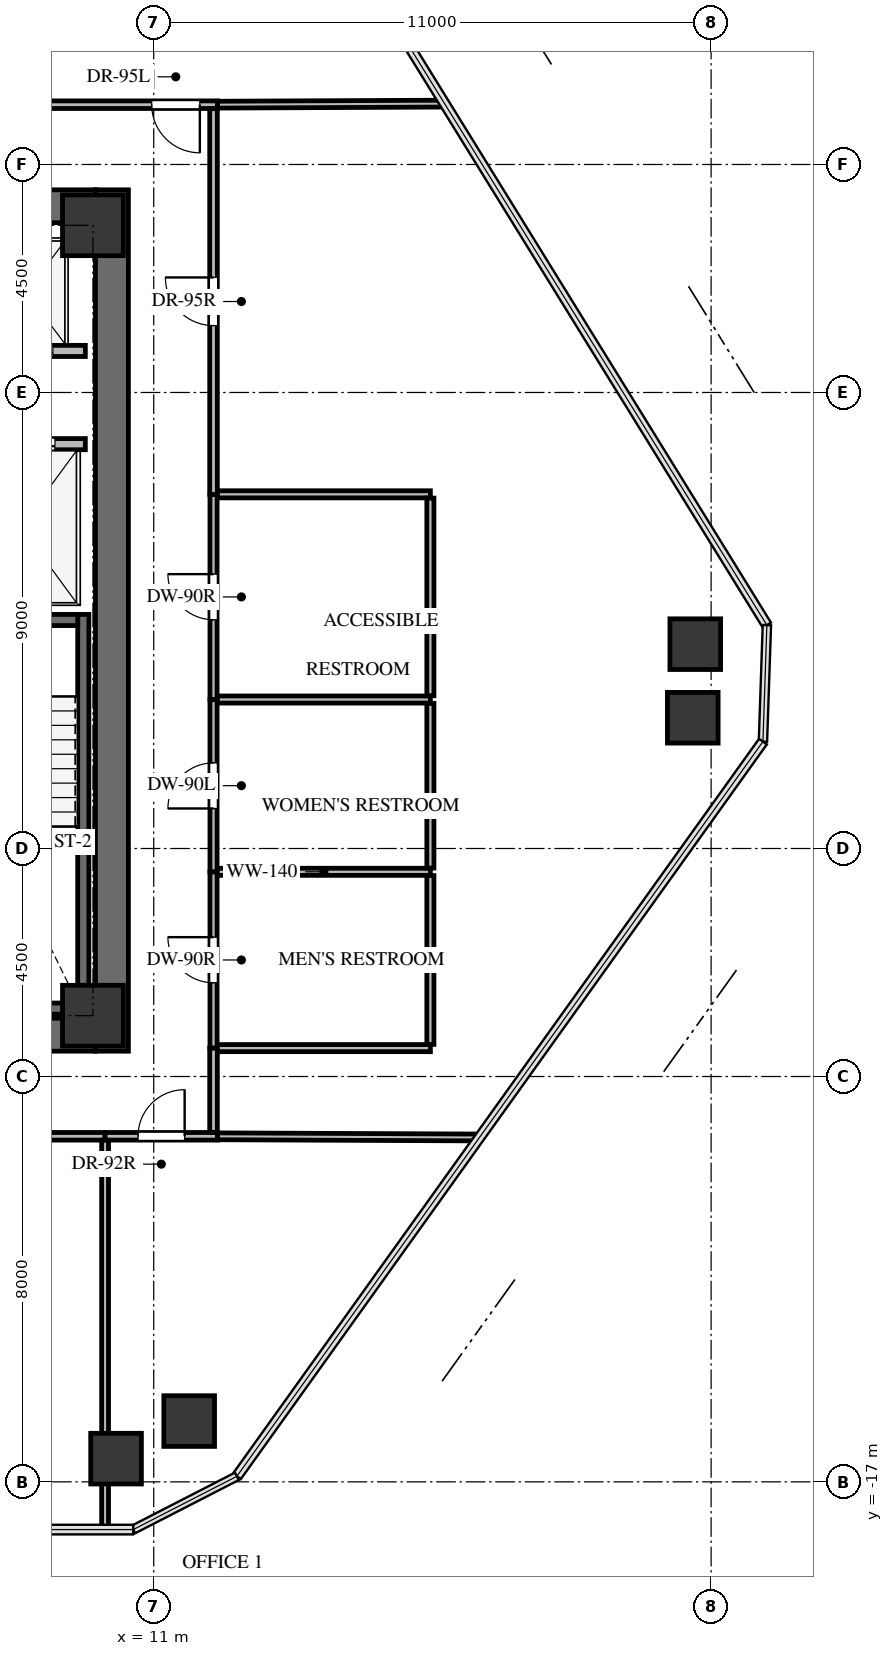
"""IFC4 building model, lengths in metres.
Left out: names, types, materials, properties, quantities, classifications, styles, units other than length and angle.
Written with IfcOpenShell. Run it as: python <this file> out.ifc"""

import sys

from ifc_helpers import new_model, si_unit, direction, frame, frame_2d, origin, origin_2d, place, context, subcontext, project, spatial, rectangle, extrude, source, transform, mapped, element, fill, save


model = new_model("IFC4")
c1 = context("Model", 3, precision=1e-05, world=origin(), true_north=direction((0.0, 1.0)))
c2 = subcontext(c1, "Body", "Model", "MODEL_VIEW")
j1 = project(units=[si_unit("LENGTHUNIT", "METRE"), si_unit("PLANEANGLEUNIT", "RADIAN")], contexts=[c1])
p1 = place(None, origin())
s1 = spatial("IfcSite", under=j1, at=p1, CompositionType="ELEMENT")
p2 = place(p1, origin())
s2 = spatial("IfcBuilding", under=s1, at=p2, CompositionType="ELEMENT")
p3 = place(p2, frame((0.0, 0.0, 180.4)))
s3 = spatial("IfcBuildingStorey", under=s2, at=p3, CompositionType="ELEMENT", Elevation=180.4)
p4 = place(p3, frame((10.175, -8.5, 0.0), z_axis=(0.0, 0.0, 1.0), x_axis=(0.0, 1.0, 0.0)))
e1 = element("IfcWall", 1, at=p4, inside=s3, PredefinedType="SHEAR", context=c2, shape_type="SweptSolid", body=[
    extrude(rectangle(XDim=17.0, YDim=0.65, at=frame_2d((8.5, 0.0))), origin(), (0.0, 0.0, 1.0), 3.3),
])
p5 = place(p3, frame((2.1, -8.175, 0.0), z_axis=(0.0, 0.0, 1.0), x_axis=(1.0, 0.0, 0.0)))
e2 = element("IfcWall", 2, at=p5, inside=s3, PredefinedType="SHEAR", context=c2, shape_type="SweptSolid", body=[
    extrude(rectangle(XDim=7.75, YDim=0.65, at=frame_2d((3.875, 0.0))), origin(), (0.0, 0.0, 1.0), 3.3),
])
p6 = place(p3, frame((-9.85, 8.175, 0.0), z_axis=(0.0, 0.0, 1.0), x_axis=(1.0, 0.0, 0.0)))
e3 = element("IfcWall", 3, at=p6, inside=s3, PredefinedType="SHEAR", context=c2, shape_type="SweptSolid", body=[
    extrude(rectangle(XDim=19.7, YDim=0.65, at=frame_2d((9.85, 0.0))), origin(), (0.0, 0.0, 1.0), 3.3),
])
p7 = place(p3, frame((9.61, -7.77, -0.24), z_axis=(0.0, 0.0, 1.0), x_axis=(0.0, 1.0, 0.0)))
e4 = element("IfcWall", 4, at=p7, inside=s3, PredefinedType="SHEAR", context=c2, shape_type="SweptSolid", body=[
    extrude(rectangle(XDim=7.89, YDim=0.22, at=frame_2d((3.945, 0.0))), origin(), (0.0, 0.0, 1.0), 3.3),
])
for number, where, z_axis, x_axis in (
    (5, (6.54, -7.66, -0.24), (0.0, 0.0, 1.0), (1.0, 0.0, 0.0)),
    (6, (9.5, 0.01, -0.24), (0.0, 0.0, 1.0), (-1.0, 0.0, 0.0)),
):
    element("IfcWall", number, at=place(p3, frame(where, z_axis=z_axis, x_axis=x_axis)), inside=s3, PredefinedType="SHEAR", context=c2, shape_type="SweptSolid", body=[
        extrude(rectangle(XDim=2.96, YDim=0.22, at=frame_2d((1.48, 0.0))), origin(), (0.0, 0.0, 1.0), 3.3),
    ])
m1 = source(origin(), c2, "Body", "SweptSolid", [
    extrude(rectangle(XDim=1.2, YDim=1.2, at=origin_2d()), origin(), (0.0, 0.0, 1.0), 3.3),
])
for number, where, z_axis, x_axis in (
    (7, (9.8, -7.8, -0.24), (0.0, 0.0, 1.0), (1.0, 0.0, 0.0)),
    (8, (9.8, 7.8, -0.24), (0.0, 0.0, 1.0), (1.0, 0.0, 0.0)),
):
    element("IfcColumn", number, at=place(p3, frame(where, z_axis=z_axis, x_axis=x_axis)), inside=s3, PredefinedType="COLUMN", context=c2, shape_type="MappedRepresentation", body=[
        mapped(m1, transform((0.0, 0.0, 0.0), x_axis=(1.0, 0.0, 0.0), y_axis=(0.0, 1.0, 0.0), z_axis=(0.0, 0.0, 1.0), scale=1.0)),
    ])
m2 = source(origin(), c2, "Body", "SweptSolid", [
    extrude(rectangle(XDim=1.0, YDim=1.0, at=origin_2d()), origin(), (0.0, 0.0, 1.0), 3.3),
])
for number, where, z_axis, x_axis in (
    (9, (21.687, -0.467, -0.24), (0.0, 0.0, 1.0), (1.0, 0.0, 0.0)),
    (10, (21.638, -1.92, -0.24), (0.0, 0.0, 1.0), (1.0, 0.0, 0.0)),
    (11, (11.7, -15.8, -0.24), (0.0, 0.0, 1.0), (1.0, 0.0, 0.0)),
    (12, (10.257, -16.542, -0.24), (0.0, 0.0, 1.0), (1.0, 0.0, 0.0)),
):
    element("IfcColumn", number, at=place(p3, frame(where, z_axis=z_axis, x_axis=x_axis)), inside=s3, PredefinedType="COLUMN", context=c2, shape_type="MappedRepresentation", body=[
        mapped(m2, transform((0.0, 0.0, 0.0), x_axis=(1.0, 0.0, 0.0), y_axis=(0.0, 1.0, 0.0), z_axis=(0.0, 0.0, 1.0), scale=1.0)),
    ])
p8 = place(p3, frame((4.6, 3.48, 0.0), z_axis=(0.0, 0.0, 1.0), x_axis=(1.0, 0.0, 0.0)))
e13 = element("IfcWall", 13, at=p8, inside=s3, PredefinedType="SOLIDWALL", context=c2, shape_type="SweptSolid", body=[
    extrude(rectangle(XDim=5.05, YDim=0.22, at=frame_2d((2.525, 0.0))), origin(), (0.0, 0.0, 1.0), 3.045),
])
p9 = place(p8, frame((0.55, 0.0, 0.0)))
e14 = element("IfcOpeningElement", 14, at=p9, cuts=e13, PredefinedType="OPENING", context=c2, shape_type="SweptSolid", body=[
    extrude(rectangle(XDim=1.4, YDim=2.15, at=frame_2d((0.7, 1.075))), frame((0.0, 0.12, 0.0), z_axis=(0.0, -1.0, 0.0), x_axis=(1.0, 0.0, 0.0)), (0.0, 0.0, 1.0), 0.24),
])
p10 = place(p8, frame((3.05, 0.0, 0.0)))
e15 = element("IfcOpeningElement", 15, at=p10, cuts=e13, PredefinedType="OPENING", context=c2, shape_type="SweptSolid", body=[
    extrude(rectangle(XDim=1.4, YDim=2.15, at=frame_2d((0.7, 1.075))), frame((0.0, 0.12, 0.0), z_axis=(0.0, -1.0, 0.0), x_axis=(1.0, 0.0, 0.0)), (0.0, 0.0, 1.0), 0.24),
])
p11 = place(p3, frame((2.325, 5.32, 0.0), z_axis=(0.0, 0.0, 1.0), x_axis=(1.0, 0.0, 0.0)))
e16 = element("IfcWall", 16, at=p11, inside=s3, PredefinedType="SOLIDWALL", context=c2, shape_type="SweptSolid", body=[
    extrude(rectangle(XDim=7.325, YDim=0.22, at=frame_2d((3.663, 0.0))), origin(), (0.0, 0.0, 1.0), 3.045),
])
p12 = place(p11, frame((0.275, 0.0, 0.0)))
e17 = element("IfcOpeningElement", 17, at=p12, cuts=e16, PredefinedType="OPENING", context=c2, shape_type="SweptSolid", body=[
    extrude(rectangle(XDim=1.1, YDim=2.15, at=frame_2d((0.55, 1.075))), frame((0.0, 0.12, 0.0), z_axis=(0.0, -1.0, 0.0), x_axis=(1.0, 0.0, 0.0)), (0.0, 0.0, 1.0), 0.24),
])
p13 = place(p11, frame((2.045, 0.0, 0.0)))
e18 = element("IfcOpeningElement", 18, at=p13, cuts=e16, PredefinedType="OPENING", context=c2, shape_type="SweptSolid", body=[
    extrude(rectangle(XDim=1.1, YDim=2.15, at=frame_2d((0.55, 1.075))), frame((0.0, 0.12, 0.0), z_axis=(0.0, -1.0, 0.0), x_axis=(1.0, 0.0, 0.0)), (0.0, 0.0, 1.0), 0.24),
])
p14 = place(p11, frame((3.815, 0.0, 0.0)))
e19 = element("IfcOpeningElement", 19, at=p14, cuts=e16, PredefinedType="OPENING", context=c2, shape_type="SweptSolid", body=[
    extrude(rectangle(XDim=1.1, YDim=2.15, at=frame_2d((0.55, 1.075))), frame((0.0, 0.12, 0.0), z_axis=(0.0, -1.0, 0.0), x_axis=(1.0, 0.0, 0.0)), (0.0, 0.0, 1.0), 0.24),
])
p15 = place(p11, frame((5.585, 0.0, 0.0)))
e20 = element("IfcOpeningElement", 20, at=p15, cuts=e16, PredefinedType="OPENING", context=c2, shape_type="SweptSolid", body=[
    extrude(rectangle(XDim=1.1, YDim=2.15, at=frame_2d((0.55, 1.075))), frame((0.0, 0.12, 0.0), z_axis=(0.0, -1.0, 0.0), x_axis=(1.0, 0.0, 0.0)), (0.0, 0.0, 1.0), 0.24),
])
p16 = place(p3, frame((12.18, -8.44, 0.0), z_axis=(0.0, 0.0, 1.0), x_axis=(0.0, 1.0, 0.0)))
e21 = element("IfcWall", 21, at=p16, inside=s3, PredefinedType="PARTITIONING", context=c2, shape_type="SweptSolid", body=[
    extrude(rectangle(XDim=3.48, YDim=0.14, at=frame_2d((1.74, 0.0))), origin(), (0.0, 0.0, 1.0), 3.045),
])
p17 = place(p16, frame((1.29, 0.0, 0.0)))
e22 = element("IfcOpeningElement", 22, at=p17, cuts=e21, PredefinedType="OPENING", context=c2, shape_type="SweptSolid", body=[
    extrude(rectangle(XDim=0.9, YDim=2.05, at=frame_2d((0.45, 1.025))), frame((0.0, 0.08, 0.0), z_axis=(0.0, -1.0, 0.0), x_axis=(1.0, 0.0, 0.0)), (0.0, 0.0, 1.0), 0.16),
])
p18 = place(p3, frame((12.18, -4.96, 0.0), z_axis=(0.0, 0.0, 1.0), x_axis=(0.0, 1.0, 0.0)))
e23 = element("IfcWall", 23, at=p18, inside=s3, PredefinedType="PARTITIONING", context=c2, shape_type="SweptSolid", body=[
    extrude(rectangle(XDim=3.4, YDim=0.14, at=frame_2d((1.7, 0.0))), origin(), (0.0, 0.0, 1.0), 3.045),
])
p19 = place(p18, frame((1.25, 0.0, 0.0)))
e24 = element("IfcOpeningElement", 24, at=p19, cuts=e23, PredefinedType="OPENING", context=c2, shape_type="SweptSolid", body=[
    extrude(rectangle(XDim=0.9, YDim=2.05, at=frame_2d((0.45, 1.025))), frame((0.0, 0.08, 0.0), z_axis=(0.0, -1.0, 0.0), x_axis=(1.0, 0.0, 0.0)), (0.0, 0.0, 1.0), 0.16),
])
p20 = place(p3, frame((12.18, -1.56, 0.0), z_axis=(0.0, 0.0, 1.0), x_axis=(0.0, 1.0, 0.0)))
e25 = element("IfcWall", 25, at=p20, inside=s3, PredefinedType="PARTITIONING", context=c2, shape_type="SweptSolid", body=[
    extrude(rectangle(XDim=4.05, YDim=0.14, at=frame_2d((2.025, 0.0))), origin(), (0.0, 0.0, 1.0), 2.242),
])
p21 = place(p20, frame((1.575, 0.0, 0.0)))
e26 = element("IfcOpeningElement", 26, at=p21, cuts=e25, PredefinedType="OPENING", context=c2, shape_type="SweptSolid", body=[
    extrude(rectangle(XDim=0.9, YDim=2.05, at=frame_2d((0.45, 1.025))), frame((0.0, 0.08, 0.0), z_axis=(0.0, -1.0, 0.0), x_axis=(1.0, 0.0, 0.0)), (0.0, 0.0, 1.0), 0.16),
])
p22 = place(p3, frame((12.26, 10.18, 0.0), z_axis=(0.0, 0.0, 1.0), x_axis=(-1.0, 0.0, 0.0)))
e27 = element("IfcWall", 27, at=p22, inside=s3, PredefinedType="PARTITIONING", context=c2, shape_type="SweptSolid", body=[
    extrude(rectangle(XDim=3.72, YDim=0.15, at=frame_2d((1.86, 0.0))), origin(), (0.0, 0.0, 1.0), 2.242),
])
p23 = place(p22, frame((0.35, 0.0, 0.0)))
e28 = element("IfcOpeningElement", 28, at=p23, cuts=e27, PredefinedType="OPENING", context=c2, shape_type="SweptSolid", body=[
    extrude(rectangle(XDim=0.95, YDim=2.1, at=frame_2d((0.475, 1.05))), frame((0.0, 0.085, 0.0), z_axis=(0.0, -1.0, 0.0), x_axis=(1.0, 0.0, 0.0)), (0.0, 0.0, 1.0), 0.17),
])
p24 = place(p3, frame((4.54, -10.18, 0.0), z_axis=(0.0, 0.0, 1.0), x_axis=(1.0, 0.0, 0.0)))
e29 = element("IfcWall", 29, at=p24, inside=s3, PredefinedType="PARTITIONING", context=c2, shape_type="SweptSolid", body=[
    extrude(rectangle(XDim=5.5, YDim=0.15, at=frame_2d((2.75, 0.0))), origin(), (0.0, 0.0, 1.0), 2.242),
])
p25 = place(p24, frame((2.3, 0.0, 0.0)))
e30 = element("IfcOpeningElement", 30, at=p25, cuts=e29, PredefinedType="OPENING", context=c2, shape_type="SweptSolid", body=[
    extrude(rectangle(XDim=0.9, YDim=2.05, at=frame_2d((0.45, 1.025))), frame((0.0, 0.085, 0.0), z_axis=(0.0, -1.0, 0.0), x_axis=(1.0, 0.0, 0.0)), (0.0, 0.0, 1.0), 0.17),
])
p26 = place(p3, frame((10.04, -10.18, 0.0), z_axis=(0.0, 0.0, 1.0), x_axis=(1.0, 0.0, 0.0)))
e31 = element("IfcWall", 31, at=p26, inside=s3, PredefinedType="PARTITIONING", context=c2, shape_type="SweptSolid", body=[
    extrude(rectangle(XDim=2.22, YDim=0.15, at=frame_2d((1.11, 0.0))), origin(), (0.0, 0.0, 1.0), 3.045),
])
p27 = place(p26, frame((0.65, 0.0, 0.0)))
e32 = element("IfcOpeningElement", 32, at=p27, cuts=e31, PredefinedType="OPENING", context=c2, shape_type="SweptSolid", body=[
    extrude(rectangle(XDim=0.92, YDim=2.1, at=frame_2d((0.46, 1.05))), frame((0.0, 0.085, 0.0), z_axis=(0.0, -1.0, 0.0), x_axis=(1.0, 0.0, 0.0)), (0.0, 0.0, 1.0), 0.17),
])
p28 = place(p3, frame((12.18, 2.49, 0.0), z_axis=(0.0, 0.0, 1.0), x_axis=(0.0, 1.0, 0.0)))
e33 = element("IfcWall", 33, at=p28, inside=s3, PredefinedType="PARTITIONING", context=c2, shape_type="SweptSolid", body=[
    extrude(rectangle(XDim=7.611, YDim=0.15, at=frame_2d((3.806, 0.0))), origin(), (0.0, 0.0, 1.0), 3.045),
])
p29 = place(p28, frame((3.331, 0.0, 0.0)))
e34 = element("IfcOpeningElement", 34, at=p29, cuts=e33, PredefinedType="OPENING", context=c2, shape_type="SweptSolid", body=[
    extrude(rectangle(XDim=0.95, YDim=2.1, at=frame_2d((0.475, 1.05))), frame((0.0, 0.085, 0.0), z_axis=(0.0, -1.0, 0.0), x_axis=(1.0, 0.0, 0.0)), (0.0, 0.0, 1.0), 0.17),
])
p30 = place(p3, frame((12.18, -10.101, 0.0), z_axis=(0.0, 0.0, 1.0), x_axis=(0.0, 1.0, 0.0)))
e35 = element("IfcWall", 35, at=p30, inside=s3, PredefinedType="PARTITIONING", context=c2, shape_type="SweptSolid", body=[
    extrude(rectangle(XDim=1.661, YDim=0.15, at=frame_2d((0.831, 0.0))), origin(), (0.0, 0.0, 1.0), 3.045),
])
p31 = place(p3, frame((12.254, -4.96, 0.0), z_axis=(0.0, 0.0, 1.0), x_axis=(1.0, 0.0, 0.0)))
e36 = element("IfcWall", 36, at=p31, inside=s3, PredefinedType="PARTITIONING", context=c2, shape_type="SweptSolid", body=[
    extrude(rectangle(XDim=4.206, YDim=0.14, at=frame_2d((2.103, 0.0))), origin(), (0.0, 0.0, 1.0), 3.045),
])
p32 = place(p3, frame((16.46, -8.44, 0.0), z_axis=(0.0, 0.0, 1.0), x_axis=(-1.0, 0.0, 0.0)))
e37 = element("IfcWall", 37, at=p32, inside=s3, PredefinedType="PARTITIONING", context=c2, shape_type="SweptSolid", body=[
    extrude(rectangle(XDim=4.201, YDim=0.14, at=frame_2d((2.101, 0.0))), origin(), (0.0, 0.0, 1.0), 3.045),
])
p33 = place(p3, frame((16.46, -5.034, 0.0), z_axis=(0.0, 0.0, 1.0), x_axis=(0.0, -1.0, 0.0)))
e38 = element("IfcWall", 38, at=p33, inside=s3, PredefinedType="PARTITIONING", context=c2, shape_type="SweptSolid", body=[
    extrude(rectangle(XDim=3.332, YDim=0.14, at=frame_2d((1.666, 0.0))), origin(), (0.0, 0.0, 1.0), 3.045),
])
p34 = place(p3, frame((12.254, -1.56, 0.0), z_axis=(0.0, 0.0, 1.0), x_axis=(1.0, 0.0, 0.0)))
e39 = element("IfcWall", 39, at=p34, inside=s3, PredefinedType="PARTITIONING", context=c2, shape_type="SweptSolid", body=[
    extrude(rectangle(XDim=4.206, YDim=0.14, at=frame_2d((2.103, 0.0))), origin(), (0.0, 0.0, 1.0), 3.045),
])
p35 = place(p3, frame((16.46, -1.634, 0.0), z_axis=(0.0, 0.0, 1.0), x_axis=(0.0, -1.0, 0.0)))
e40 = element("IfcWall", 40, at=p35, inside=s3, PredefinedType="PARTITIONING", context=c2, shape_type="SweptSolid", body=[
    extrude(rectangle(XDim=3.252, YDim=0.14, at=frame_2d((1.626, 0.0))), origin(), (0.0, 0.0, 1.0), 3.045),
])
p36 = place(p3, frame((12.259, 2.49, 0.0), z_axis=(0.0, 0.0, 1.0), x_axis=(1.0, 0.0, 0.0)))
e41 = element("IfcWall", 41, at=p36, inside=s3, PredefinedType="PARTITIONING", context=c2, shape_type="SweptSolid", body=[
    extrude(rectangle(XDim=4.201, YDim=0.14, at=frame_2d((2.101, 0.0))), origin(), (0.0, 0.0, 1.0), 3.045),
])
p37 = place(p3, frame((16.46, 2.416, 0.0), z_axis=(0.0, 0.0, 1.0), x_axis=(0.0, -1.0, 0.0)))
e42 = element("IfcWall", 42, at=p37, inside=s3, PredefinedType="PARTITIONING", context=c2, shape_type="SweptSolid", body=[
    extrude(rectangle(XDim=3.902, YDim=0.14, at=frame_2d((1.951, 0.0))), origin(), (0.0, 0.0, 1.0), 2.242),
])
p38 = place(p3, frame((16.74, 10.201, 0.0), z_axis=(0.0, 0.0, 1.0), x_axis=(-0.999989522694, -0.004577608714, 0.0)))
e43 = element("IfcWall", 43, at=p38, inside=s3, PredefinedType="PARTITIONING", context=c2, shape_type="SweptSolid", body=[
    extrude(rectangle(XDim=4.48, YDim=0.135, at=frame_2d((2.24, 0.0))), origin(), (0.0, 0.0, 1.0), 2.399),
])
p39 = place(p3, frame((10.04, -10.259, 0.0), z_axis=(0.0, 0.0, 1.0), x_axis=(0.0, -1.0, 0.0)))
e44 = element("IfcWall", 44, at=p39, inside=s3, PredefinedType="PARTITIONING", context=c2, shape_type="SweptSolid", body=[
    extrude(rectangle(XDim=6.367, YDim=0.135, at=frame_2d((3.184, 0.0))), origin(), (0.0, 0.0, 1.0), 2.242),
])
p40 = place(p3, frame((10.04, -16.626, 0.0), z_axis=(0.0, 0.0, 1.0), x_axis=(0.0, -1.0, 0.0)))
e45 = element("IfcWall", 45, at=p40, inside=s3, PredefinedType="PARTITIONING", context=c2, shape_type="SweptSolid", body=[
    extrude(rectangle(XDim=1.316, YDim=0.135, at=frame_2d((0.658, 0.0))), origin(), (0.0, 0.0, 1.0), 1.877),
])
p41 = place(p3, frame((12.26, -10.18, 0.0), z_axis=(0.0, 0.0, 1.0), x_axis=(0.999990144117, -0.004439782427, 0.0)))
e46 = element("IfcWall", 46, at=p41, inside=s3, PredefinedType="PARTITIONING", context=c2, shape_type="SweptSolid", body=[
    extrude(rectangle(XDim=5.169, YDim=0.135, at=frame_2d((2.584, 0.0))), origin(), (0.0, 0.0, 1.0), 2.399),
])
m3 = source(origin(), c2, "Body", "SweptSolid", [
    extrude(rectangle(XDim=1.4, YDim=2.15, at=frame_2d((0.7, 1.075))), frame((0.0, 0.025, 0.0), z_axis=(0.0, -1.0, 0.0), x_axis=(1.0, 0.0, 0.0)), (0.0, 0.0, 1.0), 0.05),
])
p42 = place(p10, origin())
e47 = element("IfcDoor", 47, at=p42, inside=s3, OperationType="DOUBLE_DOOR_SLIDING", PredefinedType="DOOR", context=c2, shape_type="MappedRepresentation", body=[
    mapped(m3, transform((0.0, 0.0, 0.0), x_axis=(1.0, 0.0, 0.0), y_axis=(0.0, 1.0, 0.0), z_axis=(0.0, 0.0, 1.0), scale=1.0)),
])
fill(e15, e47)
m4 = source(origin(), c2, "Body", "SweptSolid", [
    extrude(rectangle(XDim=1.1, YDim=2.15, at=frame_2d((0.55, 1.075))), frame((0.0, 0.025, 0.0), z_axis=(0.0, -1.0, 0.0), x_axis=(1.0, 0.0, 0.0)), (0.0, 0.0, 1.0), 0.05),
])
p43 = place(p15, origin())
e48 = element("IfcDoor", 48, at=p43, inside=s3, OperationType="DOUBLE_DOOR_SLIDING", PredefinedType="DOOR", context=c2, shape_type="MappedRepresentation", body=[
    mapped(m4, transform((0.0, 0.0, 0.0), x_axis=(1.0, 0.0, 0.0), y_axis=(0.0, 1.0, 0.0), z_axis=(0.0, 0.0, 1.0), scale=1.0)),
])
fill(e20, e48)
m5 = source(origin(), c2, "Body", "SweptSolid", [
    extrude(rectangle(XDim=0.9, YDim=2.05, at=frame_2d((0.45, 1.025))), frame((0.0, 0.025, 0.0), z_axis=(0.0, -1.0, 0.0), x_axis=(1.0, 0.0, 0.0)), (0.0, 0.0, 1.0), 0.05),
])
p44 = place(p17, origin())
e49 = element("IfcDoor", 49, at=p44, inside=s3, OperationType="SINGLE_SWING_RIGHT", PredefinedType="DOOR", context=c2, shape_type="MappedRepresentation", body=[
    mapped(m5, transform((0.0, 0.0, 0.0), x_axis=(1.0, 0.0, 0.0), y_axis=(0.0, 1.0, 0.0), z_axis=(0.0, 0.0, 1.0), scale=1.0)),
])
fill(e22, e49)
m6 = source(origin(), c2, "Body", "SweptSolid", [
    extrude(rectangle(XDim=0.9, YDim=2.05, at=frame_2d((0.45, 1.025))), frame((0.0, 0.025, 0.0), z_axis=(0.0, -1.0, 0.0), x_axis=(1.0, 0.0, 0.0)), (0.0, 0.0, 1.0), 0.05),
])
p45 = place(p19, origin())
e50 = element("IfcDoor", 50, at=p45, inside=s3, OperationType="SINGLE_SWING_LEFT", PredefinedType="DOOR", context=c2, shape_type="MappedRepresentation", body=[
    mapped(m6, transform((0.0, 0.0, 0.0), x_axis=(1.0, 0.0, 0.0), y_axis=(0.0, 1.0, 0.0), z_axis=(0.0, 0.0, 1.0), scale=1.0)),
])
fill(e24, e50)
p46 = place(p21, origin())
e51 = element("IfcDoor", 51, at=p46, inside=s3, OperationType="SINGLE_SWING_RIGHT", PredefinedType="DOOR", context=c2, shape_type="MappedRepresentation", body=[
    mapped(m5, transform((0.0, 0.0, 0.0), x_axis=(1.0, 0.0, 0.0), y_axis=(0.0, 1.0, 0.0), z_axis=(0.0, 0.0, 1.0), scale=1.0)),
])
fill(e26, e51)
m7 = source(origin(), c2, "Body", "SweptSolid", [
    extrude(rectangle(XDim=0.95, YDim=2.1, at=frame_2d((0.475, 1.05))), frame((0.0, 0.025, 0.0), z_axis=(0.0, -1.0, 0.0), x_axis=(1.0, 0.0, 0.0)), (0.0, 0.0, 1.0), 0.05),
])
p47 = place(p23, origin())
e52 = element("IfcDoor", 52, at=p47, inside=s3, OperationType="SINGLE_SWING_LEFT", PredefinedType="DOOR", context=c2, shape_type="MappedRepresentation", body=[
    mapped(m7, transform((0.0, 0.0, 0.0), x_axis=(1.0, 0.0, 0.0), y_axis=(0.0, 1.0, 0.0), z_axis=(0.0, 0.0, 1.0), scale=1.0)),
])
fill(e28, e52)
m8 = source(origin(), c2, "Body", "SweptSolid", [
    extrude(rectangle(XDim=0.92, YDim=2.1, at=frame_2d((0.46, 1.05))), frame((0.0, 0.025, 0.0), z_axis=(0.0, -1.0, 0.0), x_axis=(1.0, 0.0, 0.0)), (0.0, 0.0, 1.0), 0.05),
])
p48 = place(p27, origin())
e53 = element("IfcDoor", 53, at=p48, inside=s3, OperationType="SINGLE_SWING_RIGHT", PredefinedType="DOOR", context=c2, shape_type="MappedRepresentation", body=[
    mapped(m8, transform((0.0, 0.0, 0.0), x_axis=(1.0, 0.0, 0.0), y_axis=(0.0, 1.0, 0.0), z_axis=(0.0, 0.0, 1.0), scale=1.0)),
])
fill(e32, e53)
m9 = source(origin(), c2, "Body", "SweptSolid", [
    extrude(rectangle(XDim=0.95, YDim=2.1, at=frame_2d((0.475, 1.05))), frame((0.0, 0.025, 0.0), z_axis=(0.0, -1.0, 0.0), x_axis=(1.0, 0.0, 0.0)), (0.0, 0.0, 1.0), 0.05),
])
p49 = place(p29, origin())
e54 = element("IfcDoor", 54, at=p49, inside=s3, OperationType="SINGLE_SWING_RIGHT", PredefinedType="DOOR", context=c2, shape_type="MappedRepresentation", body=[
    mapped(m9, transform((0.0, 0.0, 0.0), x_axis=(1.0, 0.0, 0.0), y_axis=(0.0, 1.0, 0.0), z_axis=(0.0, 0.0, 1.0), scale=1.0)),
])
fill(e34, e54)
save(model, sys.argv[1])
